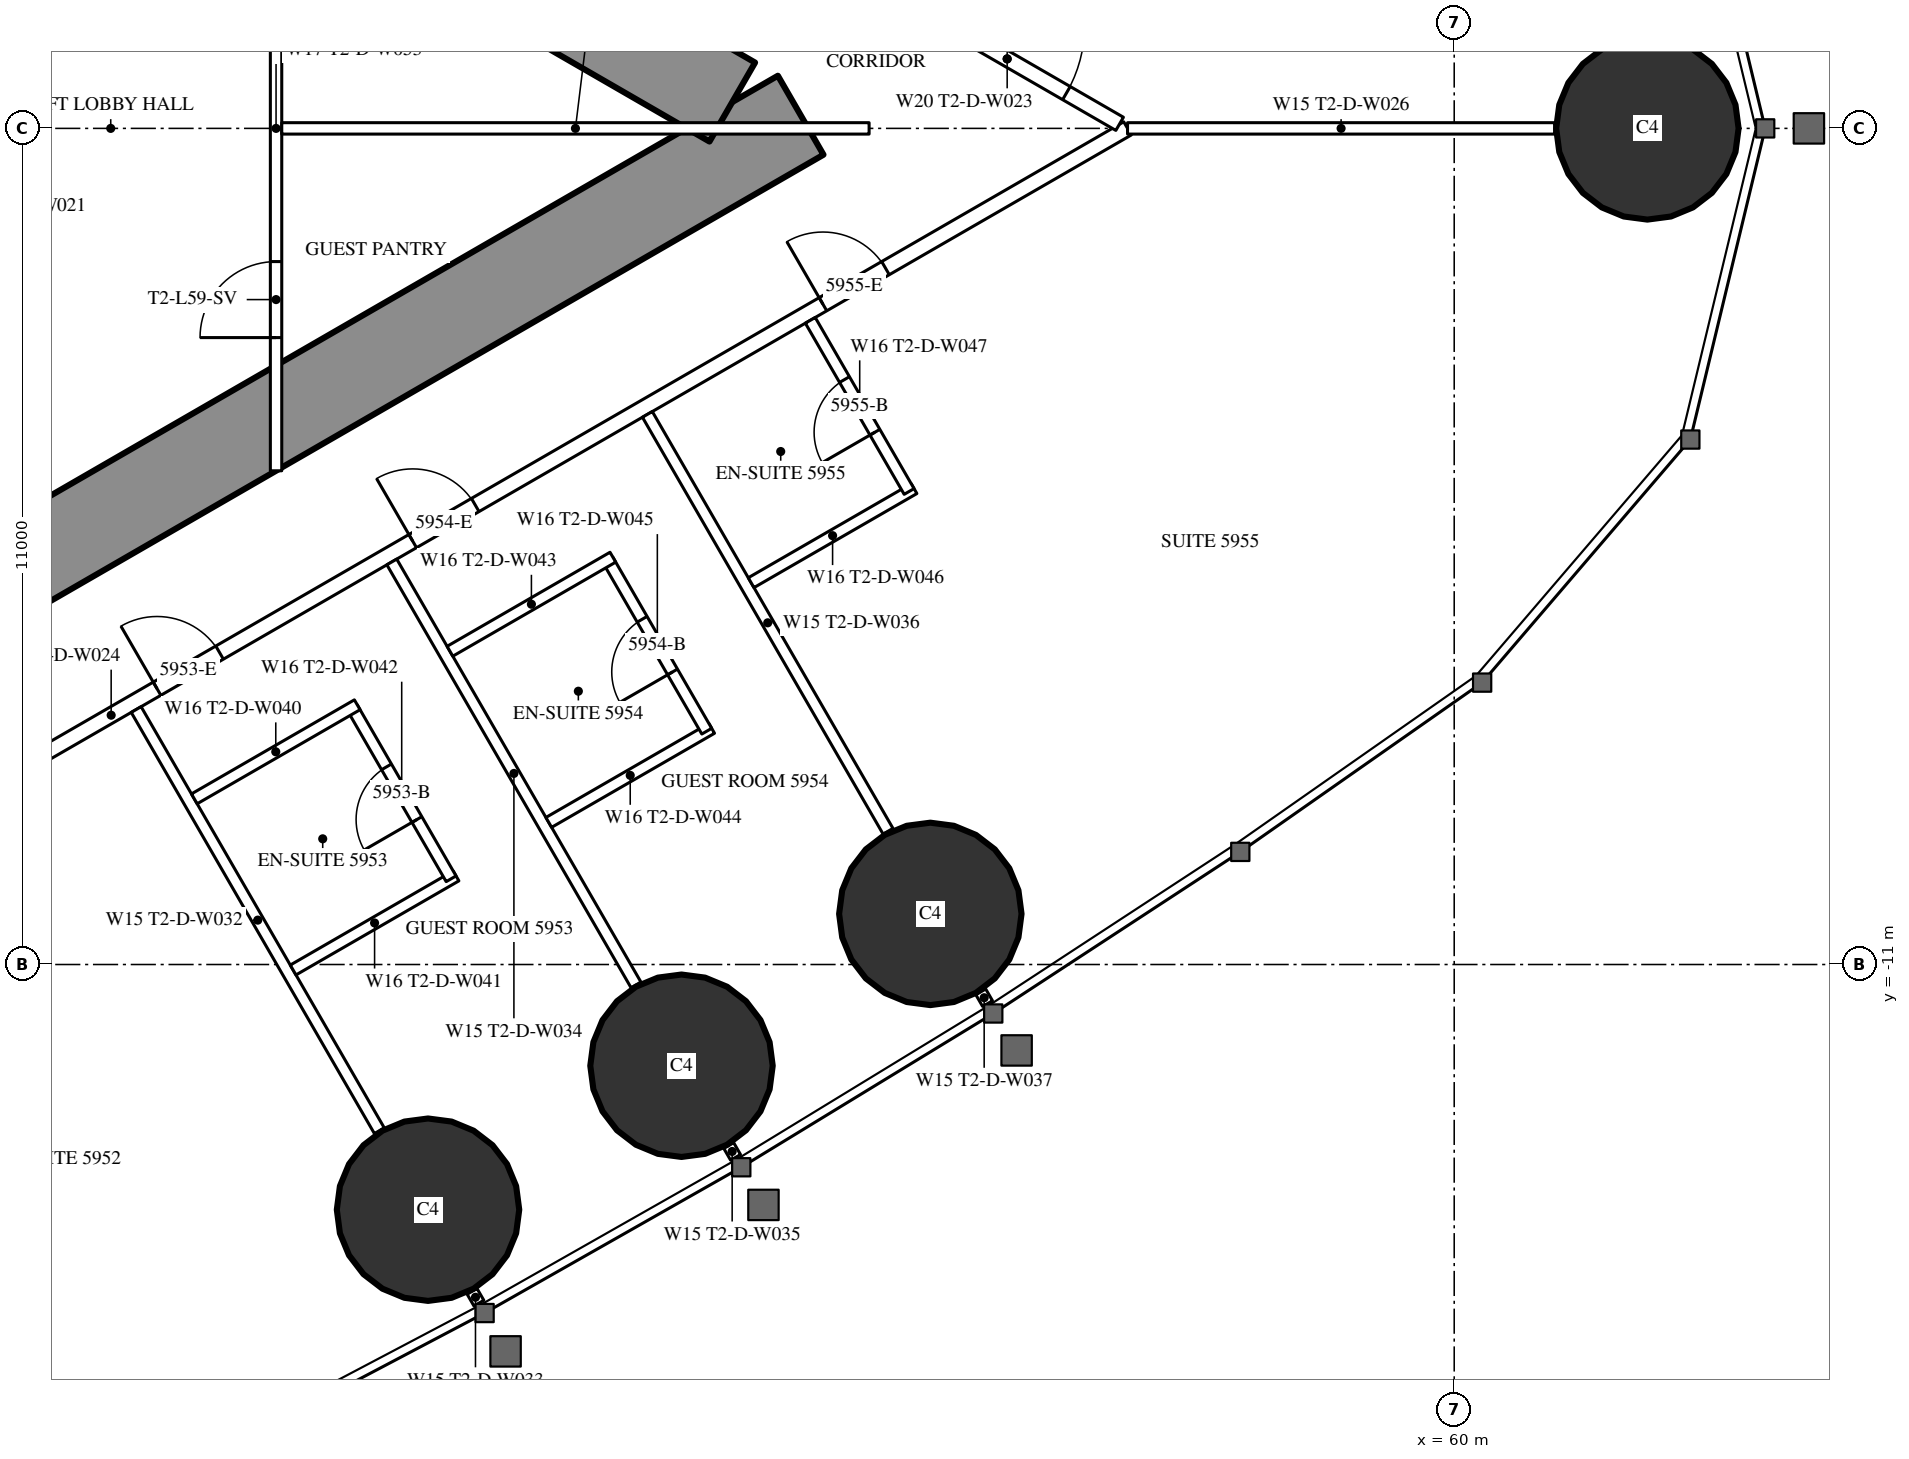
"""IFC4 building model, lengths in metres.
Left out: names, types, materials, properties, quantities, classifications, styles, units other than length and angle.
Written with IfcOpenShell. Run it as: python <this file> out.ifc"""

import sys

from ifc_helpers import new_model, si_unit, direction, frame, frame_2d, origin, origin_2d, place, context, subcontext, project, spatial, rectangle, circle, extrude, element, fill, save


model = new_model("IFC4")
c1 = context("Model", 3, precision=1e-05, world=origin(), true_north=direction((0.0, 1.0)))
c2 = subcontext(c1, "Body", "Model", "MODEL_VIEW")
j1 = project(units=[si_unit("LENGTHUNIT", "METRE"), si_unit("PLANEANGLEUNIT", "RADIAN")], contexts=[c1])
p1 = place(None, origin())
s1 = spatial("IfcSite", under=j1, at=p1, CompositionType="ELEMENT")
p2 = place(p1, origin())
s2 = spatial("IfcBuilding", under=s1, at=p2, CompositionType="ELEMENT")
p3 = place(p2, frame((0.0, 0.0, 222.5)))
s3 = spatial("IfcBuildingStorey", under=s2, at=p3, CompositionType="ELEMENT", Elevation=222.5)
for number, where, z_axis, x_axis in (
    (1, (62.542, 0.0, 0.0), (0.0, 0.0, 1.0), (1.0, 0.0, 0.0)),
    (2, (46.499, -14.226, 0.0), (0.0, 0.0, 1.0), (1.0, 0.0, 0.0)),
    (3, (49.834, -12.332, 0.0), (0.0, 0.0, 1.0), (1.0, 0.0, 0.0)),
    (4, (53.108, -10.334, 0.0), (0.0, 0.0, 1.0), (1.0, 0.0, 0.0)),
):
    element("IfcColumn", number, at=place(p3, frame(where, z_axis=z_axis, x_axis=x_axis)), inside=s3, PredefinedType="COLUMN", context=c2, shape_type="SweptSolid", body=[
        extrude(circle(Radius=1.2, at=origin_2d()), origin(), (0.0, 0.0, 1.0), 3.6),
    ])
p4 = place(p3, frame((27.2, -13.8, 0.0), z_axis=(0.0, 0.0, 1.0), x_axis=(0.866027159892, 0.499996958321, 0.0)))
e5 = element("IfcWall", 5, at=p4, inside=s3, PredefinedType="SHEAR", context=c2, shape_type="SweptSolid", body=[
    extrude(rectangle(XDim=27.947, YDim=1.2, at=frame_2d((13.973, 0.0))), origin(), (0.0, 0.0, 1.0), 3.6),
])
p5 = place(p4, frame((4.6, 0.0, 0.0)))
e6 = element("IfcOpeningElement", 6, at=p5, cuts=e5, PredefinedType="OPENING", context=c2, shape_type="SweptSolid", body=[
    extrude(rectangle(XDim=1.0, YDim=2.2, at=frame_2d((0.5, 1.1))), frame((0.0, 0.61, 0.0), z_axis=(0.0, -1.0, 0.0), x_axis=(1.0, 0.0, 0.0)), (0.0, 0.0, 1.0), 1.22),
])
p6 = place(p4, frame((13.395, 0.0, 0.0)))
e7 = element("IfcOpeningElement", 7, at=p6, cuts=e5, PredefinedType="OPENING", context=c2, shape_type="SweptSolid", body=[
    extrude(rectangle(XDim=1.8, YDim=2.2, at=frame_2d((0.9, 1.1))), frame((0.0, 0.61, 0.0), z_axis=(0.0, -1.0, 0.0), x_axis=(1.0, 0.0, 0.0)), (0.0, 0.0, 1.0), 1.22),
])
p7 = place(p3, frame((27.2, 13.8, 0.0), z_axis=(0.0, 0.0, 1.0), x_axis=(0.866024515034, -0.500001539357, 0.0)))
e8 = element("IfcWall", 8, at=p7, inside=s3, PredefinedType="SHEAR", context=c2, shape_type="SweptSolid", body=[
    extrude(rectangle(XDim=26.907, YDim=1.2, at=frame_2d((13.454, 0.0))), origin(), (0.0, 0.0, 1.0), 3.6),
])
p8 = place(p7, frame((4.6, 0.0, 0.0)))
e9 = element("IfcOpeningElement", 9, at=p8, cuts=e8, PredefinedType="OPENING", context=c2, shape_type="SweptSolid", body=[
    extrude(rectangle(XDim=1.0, YDim=2.2, at=frame_2d((0.5, 1.1))), frame((0.0, 0.61, 0.0), z_axis=(0.0, -1.0, 0.0), x_axis=(1.0, 0.0, 0.0)), (0.0, 0.0, 1.0), 1.22),
])
p9 = place(p7, frame((13.395, 0.0, 0.0)))
e10 = element("IfcOpeningElement", 10, at=p9, cuts=e8, PredefinedType="OPENING", context=c2, shape_type="SweptSolid", body=[
    extrude(rectangle(XDim=1.8, YDim=2.2, at=frame_2d((0.9, 1.1))), frame((0.0, 0.61, 0.0), z_axis=(0.0, -1.0, 0.0), x_axis=(1.0, 0.0, 0.0)), (0.0, 0.0, 1.0), 1.22),
])
p10 = place(p3, frame((28.959, -15.44, 0.0), z_axis=(0.0, 0.0, 1.0), x_axis=(0.866025227435, 0.500000305447, 0.0)))
e11 = element("IfcWall", 11, at=p10, inside=s3, PredefinedType="PARTITIONING", context=c2, shape_type="SweptSolid", body=[
    extrude(rectangle(XDim=30.88, YDim=0.2, at=frame_2d((15.44, 0.0))), origin(), (0.0, 0.0, 1.0), 3.35),
])
p11 = place(p10, frame((1.494, 0.0, 0.0)))
e12 = element("IfcOpeningElement", 12, at=p11, cuts=e11, PredefinedType="OPENING", context=c2, shape_type="SweptSolid", body=[
    extrude(rectangle(XDim=1.8, YDim=2.03, at=frame_2d((0.9, 1.015))), frame((0.0, 0.11, 0.0), z_axis=(0.0, -1.0, 0.0), x_axis=(1.0, 0.0, 0.0)), (0.0, 0.0, 1.0), 0.22),
])
p12 = place(p10, frame((7.687, 0.0, 0.0)))
e13 = element("IfcOpeningElement", 13, at=p12, cuts=e11, PredefinedType="OPENING", context=c2, shape_type="SweptSolid", body=[
    extrude(rectangle(XDim=1.0, YDim=2.2, at=frame_2d((0.5, 1.1))), frame((0.0, 0.11, 0.0), z_axis=(0.0, -1.0, 0.0), x_axis=(1.0, 0.0, 0.0)), (0.0, 0.0, 1.0), 0.22),
])
p13 = place(p10, frame((16.137, 0.0, 0.0)))
e14 = element("IfcOpeningElement", 14, at=p13, cuts=e11, PredefinedType="OPENING", context=c2, shape_type="SweptSolid", body=[
    extrude(rectangle(XDim=0.95, YDim=2.2, at=frame_2d((0.475, 1.1))), frame((0.0, 0.11, 0.0), z_axis=(0.0, -1.0, 0.0), x_axis=(1.0, 0.0, 0.0)), (0.0, 0.0, 1.0), 0.22),
])
p14 = place(p10, frame((20.021, 0.0, 0.0)))
e15 = element("IfcOpeningElement", 15, at=p14, cuts=e11, PredefinedType="OPENING", context=c2, shape_type="SweptSolid", body=[
    extrude(rectangle(XDim=0.95, YDim=2.2, at=frame_2d((0.475, 1.1))), frame((0.0, 0.11, 0.0), z_axis=(0.0, -1.0, 0.0), x_axis=(1.0, 0.0, 0.0)), (0.0, 0.0, 1.0), 0.22),
])
p15 = place(p10, frame((26.253, 0.0, 0.0)))
e16 = element("IfcOpeningElement", 16, at=p15, cuts=e11, PredefinedType="OPENING", context=c2, shape_type="SweptSolid", body=[
    extrude(rectangle(XDim=0.95, YDim=2.2, at=frame_2d((0.475, 1.1))), frame((0.0, 0.11, 0.0), z_axis=(0.0, -1.0, 0.0), x_axis=(1.0, 0.0, 0.0)), (0.0, 0.0, 1.0), 0.22),
])
p16 = place(p3, frame((42.66, -7.646, 0.0), z_axis=(0.0, 0.0, 1.0), x_axis=(0.499996592859, -0.866027370889, 0.0)))
e17 = element("IfcWall", 17, at=p16, inside=s3, PredefinedType="PARTITIONING", context=c2, shape_type="SweptSolid", body=[
    extrude(rectangle(XDim=6.398, YDim=0.15, at=frame_2d((3.199, 0.0))), origin(), (0.0, 0.0, 1.0), 2.45),
])
p17 = place(p3, frame((47.079, -15.3, 0.0), z_axis=(0.0, 0.0, 1.0), x_axis=(0.499212083968, -0.866479829667, 0.0)))
e18 = element("IfcWall", 18, at=p17, inside=s3, PredefinedType="PARTITIONING", context=c2, shape_type="SweptSolid", body=[
    extrude(rectangle(XDim=0.179, YDim=0.15, at=frame_2d((0.09, 0.0))), origin(), (0.0, 0.0, 1.0), 2.45),
])
p18 = place(p3, frame((46.023, -5.704, 0.0), z_axis=(0.0, 0.0, 1.0), x_axis=(0.499984478165, -0.866034365135, 0.0)))
e19 = element("IfcWall", 19, at=p18, inside=s3, PredefinedType="PARTITIONING", context=c2, shape_type="SweptSolid", body=[
    extrude(rectangle(XDim=6.426, YDim=0.15, at=frame_2d((3.213, 0.0))), origin(), (0.0, 0.0, 1.0), 2.45),
])
p19 = place(p3, frame((50.456, -13.382, 0.0), z_axis=(0.0, 0.0, 1.0), x_axis=(0.500661834965, -0.865642955848, 0.0)))
e20 = element("IfcWall", 20, at=p19, inside=s3, PredefinedType="PARTITIONING", context=c2, shape_type="SweptSolid", body=[
    extrude(rectangle(XDim=0.18, YDim=0.15, at=frame_2d((0.09, 0.0))), origin(), (0.0, 0.0, 1.0), 2.45),
])
p20 = place(p3, frame((49.385, -3.763, 0.0), z_axis=(0.0, 0.0, 1.0), x_axis=(0.499999447814, -0.866025722589, 0.0)))
e21 = element("IfcWall", 21, at=p20, inside=s3, PredefinedType="PARTITIONING", context=c2, shape_type="SweptSolid", body=[
    extrude(rectangle(XDim=6.333, YDim=0.15, at=frame_2d((3.166, 0.0))), origin(), (0.0, 0.0, 1.0), 2.45),
])
p21 = place(p3, frame((53.771, -11.36, 0.0), z_axis=(0.0, 0.0, 1.0), x_axis=(0.499524978789, -0.866299483762, 0.0)))
e22 = element("IfcWall", 22, at=p21, inside=s3, PredefinedType="PARTITIONING", context=c2, shape_type="SweptSolid", body=[
    extrude(rectangle(XDim=0.178, YDim=0.15, at=frame_2d((0.089, 0.0))), origin(), (0.0, 0.0, 1.0), 2.45),
])
p22 = place(p3, frame((55.702, 0.0, 0.0), z_axis=(0.0, 0.0, 1.0), x_axis=(1.0, 0.0, 0.0)))
e23 = element("IfcWall", 23, at=p22, inside=s3, PredefinedType="PARTITIONING", context=c2, shape_type="SweptSolid", body=[
    extrude(rectangle(XDim=5.619, YDim=0.15, at=frame_2d((2.81, 0.0))), origin(), (0.0, 0.0, 1.0), 2.45),
])
p23 = place(p3, frame((52.639, 1.769, 0.0), z_axis=(0.0, 0.0, 1.0), x_axis=(0.866027340901, -0.4999966448, 0.0)))
e24 = element("IfcWall", 24, at=p23, inside=s3, PredefinedType="PARTITIONING", context=c2, shape_type="SweptSolid", body=[
    extrude(rectangle(XDim=3.417, YDim=0.2, at=frame_2d((1.708, 0.0))), origin(), (0.0, 0.0, 1.0), 3.35),
])
p24 = place(p23, frame((0.809, 0.0, 0.0)))
e25 = element("IfcOpeningElement", 25, at=p24, cuts=e24, PredefinedType="OPENING", context=c2, shape_type="SweptSolid", body=[
    extrude(rectangle(XDim=1.8, YDim=2.2, at=frame_2d((0.9, 1.1))), frame((0.0, 0.11, 0.0), z_axis=(0.0, -1.0, 0.0), x_axis=(1.0, 0.0, 0.0)), (0.0, 0.0, 1.0), 0.22),
])
p25 = place(p3, frame((44.725, -11.072, 0.0), z_axis=(0.0, 0.0, 1.0), x_axis=(0.866006523861, 0.500032699561, 0.0)))
e26 = element("IfcWall", 26, at=p25, inside=s3, PredefinedType="PARTITIONING", context=c2, shape_type="SweptSolid", body=[
    extrude(rectangle(XDim=2.475, YDim=0.15, at=frame_2d((1.237, 0.0))), origin(), (0.0, 0.0, 1.0), 3.35),
])
p26 = place(p3, frame((45.503, -7.621, 0.0), z_axis=(0.0, 0.0, 1.0), x_axis=(0.500006934395, -0.866021400173, 0.0)))
e27 = element("IfcWall", 27, at=p26, inside=s3, PredefinedType="PARTITIONING", context=c2, shape_type="SweptSolid", body=[
    extrude(rectangle(XDim=2.6, YDim=0.15, at=frame_2d((1.3, 0.0))), origin(), (0.0, 0.0, 1.0), 3.35),
])
p27 = place(p26, frame((0.9, 0.0, 0.0)))
e28 = element("IfcOpeningElement", 28, at=p27, cuts=e27, PredefinedType="OPENING", context=c2, shape_type="SweptSolid", body=[
    extrude(rectangle(XDim=0.8, YDim=2.2, at=frame_2d((0.4, 1.1))), frame((0.0, 0.085, 0.0), z_axis=(0.0, -1.0, 0.0), x_axis=(1.0, 0.0, 0.0)), (0.0, 0.0, 1.0), 0.17),
])
for number, where, z_axis, x_axis in (
    (29, (43.425, -8.821, 0.0), (0.0, 0.0, 1.0), (0.866, 0.5, 0.0)),
    (30, (48.088, -9.13, 0.0), (0.0, 0.0, 1.0), (0.866, 0.5, 0.0)),
):
    element("IfcWall", number, at=place(p3, frame(where, z_axis=z_axis, x_axis=x_axis)), inside=s3, PredefinedType="PARTITIONING", context=c2, shape_type="SweptSolid", body=[
        extrude(rectangle(XDim=2.475, YDim=0.15, at=frame_2d((1.237, 0.0))), origin(), (0.0, 0.0, 1.0), 3.35),
    ])
p28 = place(p3, frame((48.866, -5.679, 0.0), z_axis=(0.0, 0.0, 1.0), x_axis=(0.500006934395, -0.866021400173, 0.0)))
e31 = element("IfcWall", 31, at=p28, inside=s3, PredefinedType="PARTITIONING", context=c2, shape_type="SweptSolid", body=[
    extrude(rectangle(XDim=2.6, YDim=0.15, at=frame_2d((1.3, 0.0))), origin(), (0.0, 0.0, 1.0), 3.35),
])
p29 = place(p28, frame((0.9, 0.0, 0.0)))
e32 = element("IfcOpeningElement", 32, at=p29, cuts=e31, PredefinedType="OPENING", context=c2, shape_type="SweptSolid", body=[
    extrude(rectangle(XDim=0.8, YDim=2.2, at=frame_2d((0.4, 1.1))), frame((0.0, 0.085, 0.0), z_axis=(0.0, -1.0, 0.0), x_axis=(1.0, 0.0, 0.0)), (0.0, 0.0, 1.0), 0.17),
])
p30 = place(p3, frame((46.788, -6.879, 0.0), z_axis=(0.0, 0.0, 1.0), x_axis=(0.866006523861, 0.500032699561, 0.0)))
e33 = element("IfcWall", 33, at=p30, inside=s3, PredefinedType="PARTITIONING", context=c2, shape_type="SweptSolid", body=[
    extrude(rectangle(XDim=2.475, YDim=0.15, at=frame_2d((1.237, 0.0))), origin(), (0.0, 0.0, 1.0), 3.35),
])
p31 = place(p3, frame((50.75, -5.977, 0.0), z_axis=(0.0, 0.0, 1.0), x_axis=(0.866031185235, 0.4999899861, 0.0)))
e34 = element("IfcWall", 34, at=p31, inside=s3, PredefinedType="PARTITIONING", context=c2, shape_type="SweptSolid", body=[
    extrude(rectangle(XDim=2.475, YDim=0.15, at=frame_2d((1.238, 0.0))), origin(), (0.0, 0.0, 1.0), 3.35),
])
p32 = place(p3, frame((51.529, -2.525, 0.0), z_axis=(0.0, 0.0, 1.0), x_axis=(0.500006934395, -0.866021400173, 0.0)))
e35 = element("IfcWall", 35, at=p32, inside=s3, PredefinedType="PARTITIONING", context=c2, shape_type="SweptSolid", body=[
    extrude(rectangle(XDim=2.6, YDim=0.15, at=frame_2d((1.3, 0.0))), origin(), (0.0, 0.0, 1.0), 3.35),
])
p33 = place(p32, frame((0.9, 0.0, 0.0)))
e36 = element("IfcOpeningElement", 36, at=p33, cuts=e35, PredefinedType="OPENING", context=c2, shape_type="SweptSolid", body=[
    extrude(rectangle(XDim=0.8, YDim=2.2, at=frame_2d((0.4, 1.1))), frame((0.0, 0.085, 0.0), z_axis=(0.0, -1.0, 0.0), x_axis=(1.0, 0.0, 0.0)), (0.0, 0.0, 1.0), 0.17),
])
p34 = place(p3, frame((44.5, -4.505, 0.0), z_axis=(0.0, 0.0, 1.0), x_axis=(0.0, 1.0, 0.0)))
e37 = element("IfcWall", 37, at=p34, inside=s3, PredefinedType="PARTITIONING", context=c2, shape_type="SweptSolid", body=[
    extrude(rectangle(XDim=9.009, YDim=0.15, at=frame_2d((4.505, 0.0))), origin(), (0.0, 0.0, 1.0), 3.35),
])
p35 = place(p34, frame((1.752, 0.0, 0.0)))
e38 = element("IfcOpeningElement", 38, at=p35, cuts=e37, PredefinedType="OPENING", context=c2, shape_type="SweptSolid", body=[
    extrude(rectangle(XDim=1.0, YDim=2.2, at=frame_2d((0.5, 1.1))), frame((0.0, 0.085, 0.0), z_axis=(0.0, -1.0, 0.0), x_axis=(1.0, 0.0, 0.0)), (0.0, 0.0, 1.0), 0.17),
])
p36 = place(p34, frame((6.257, 0.0, 0.0)))
e39 = element("IfcOpeningElement", 39, at=p36, cuts=e37, PredefinedType="OPENING", context=c2, shape_type="SweptSolid", body=[
    extrude(rectangle(XDim=1.0, YDim=2.2, at=frame_2d((0.5, 1.1))), frame((0.0, 0.085, 0.0), z_axis=(0.0, -1.0, 0.0), x_axis=(1.0, 0.0, 0.0)), (0.0, 0.0, 1.0), 0.17),
])
p37 = place(p3, frame((44.575, 0.0, 0.0), z_axis=(0.0, 0.0, 1.0), x_axis=(1.0, 0.0, 0.0)))
e40 = element("IfcWall", 40, at=p37, inside=s3, PredefinedType="PARTITIONING", context=c2, shape_type="SweptSolid", body=[
    extrude(rectangle(XDim=7.727, YDim=0.15, at=frame_2d((3.864, 0.0))), origin(), (0.0, 0.0, 1.0), 2.45),
])
p38 = place(p27, origin())
e41 = element("IfcDoor", 41, at=p38, inside=s3, OperationType="SINGLE_SWING_RIGHT", PredefinedType="DOOR", context=c2, shape_type="SweptSolid", body=[
    extrude(rectangle(XDim=0.8, YDim=2.2, at=frame_2d((0.4, 1.1))), frame((0.0, 0.025, 0.0), z_axis=(0.0, -1.0, 0.0), x_axis=(1.0, 0.0, 0.0)), (0.0, 0.0, 1.0), 0.05),
])
fill(e28, e41)
p39 = place(p13, origin())
e42 = element("IfcDoor", 42, at=p39, inside=s3, OperationType="SINGLE_SWING_LEFT", PredefinedType="DOOR", context=c2, shape_type="SweptSolid", body=[
    extrude(rectangle(XDim=0.95, YDim=2.2, at=frame_2d((0.475, 1.1))), frame((0.0, 0.025, 0.0), z_axis=(0.0, -1.0, 0.0), x_axis=(1.0, 0.0, 0.0)), (0.0, 0.0, 1.0), 0.05),
])
fill(e14, e42)
p40 = place(p29, origin())
e43 = element("IfcDoor", 43, at=p40, inside=s3, OperationType="SINGLE_SWING_RIGHT", PredefinedType="DOOR", context=c2, shape_type="SweptSolid", body=[
    extrude(rectangle(XDim=0.8, YDim=2.2, at=frame_2d((0.4, 1.1))), frame((0.0, 0.025, 0.0), z_axis=(0.0, -1.0, 0.0), x_axis=(1.0, 0.0, 0.0)), (0.0, 0.0, 1.0), 0.05),
])
fill(e32, e43)
p41 = place(p14, origin())
e44 = element("IfcDoor", 44, at=p41, inside=s3, OperationType="SINGLE_SWING_LEFT", PredefinedType="DOOR", context=c2, shape_type="SweptSolid", body=[
    extrude(rectangle(XDim=0.95, YDim=2.2, at=frame_2d((0.475, 1.1))), frame((0.0, 0.025, 0.0), z_axis=(0.0, -1.0, 0.0), x_axis=(1.0, 0.0, 0.0)), (0.0, 0.0, 1.0), 0.05),
])
fill(e15, e44)
p42 = place(p33, origin())
e45 = element("IfcDoor", 45, at=p42, inside=s3, OperationType="SINGLE_SWING_RIGHT", PredefinedType="DOOR", context=c2, shape_type="SweptSolid", body=[
    extrude(rectangle(XDim=0.8, YDim=2.2, at=frame_2d((0.4, 1.1))), frame((0.0, 0.025, 0.0), z_axis=(0.0, -1.0, 0.0), x_axis=(1.0, 0.0, 0.0)), (0.0, 0.0, 1.0), 0.05),
])
fill(e36, e45)
p43 = place(p15, origin())
e46 = element("IfcDoor", 46, at=p43, inside=s3, OperationType="SINGLE_SWING_LEFT", PredefinedType="DOOR", context=c2, shape_type="SweptSolid", body=[
    extrude(rectangle(XDim=0.95, YDim=2.2, at=frame_2d((0.475, 1.1))), frame((0.0, 0.025, 0.0), z_axis=(0.0, -1.0, 0.0), x_axis=(1.0, 0.0, 0.0)), (0.0, 0.0, 1.0), 0.05),
])
fill(e16, e46)
p44 = place(p24, origin())
e47 = element("IfcDoor", 47, at=p44, inside=s3, OperationType="DOUBLE_DOOR_SINGLE_SWING", PredefinedType="DOOR", context=c2, shape_type="SweptSolid", body=[
    extrude(rectangle(XDim=1.8, YDim=2.2, at=frame_2d((0.9, 1.1))), frame((0.0, 0.025, 0.0), z_axis=(0.0, -1.0, 0.0), x_axis=(1.0, 0.0, 0.0)), (0.0, 0.0, 1.0), 0.05),
])
fill(e25, e47)
p45 = place(p35, origin())
e48 = element("IfcDoor", 48, at=p45, inside=s3, OperationType="SINGLE_SWING_LEFT", PredefinedType="DOOR", context=c2, shape_type="SweptSolid", body=[
    extrude(rectangle(XDim=1.0, YDim=2.2, at=frame_2d((0.5, 1.1))), frame((0.0, 0.025, 0.0), z_axis=(0.0, -1.0, 0.0), x_axis=(1.0, 0.0, 0.0)), (0.0, 0.0, 1.0), 0.05),
])
fill(e38, e48)
save(model, sys.argv[1])
